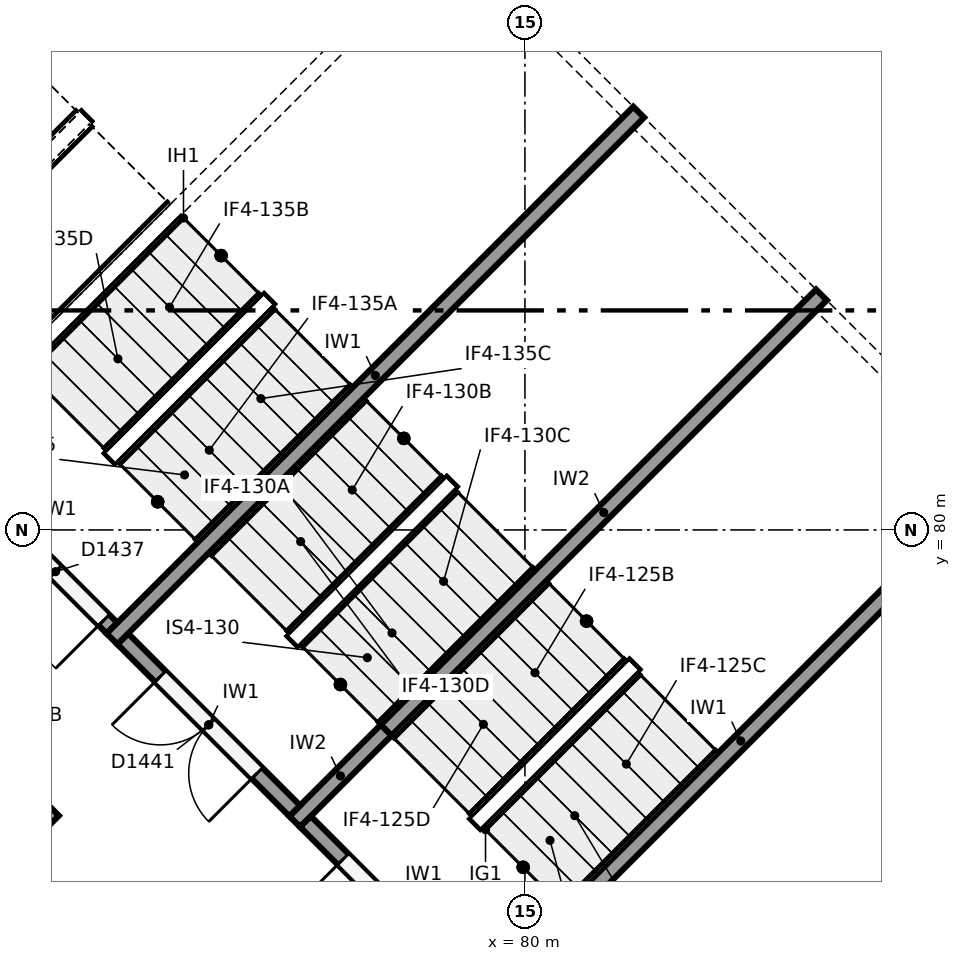
"""IFC4 building model, lengths in metres.
Left out: names, types, materials, properties, quantities, classifications, styles, units other than length and angle.
Written with IfcOpenShell. Run it as: python <this file> out.ifc"""

import sys

from ifc_helpers import new_model, si_unit, direction, frame, frame_2d, origin, place, context, subcontext, project, spatial, rectangle, extrude, element, fill, save


model = new_model("IFC4")
c1 = context("Model", 3, precision=1e-05, world=origin(), true_north=direction((0.0, 1.0)))
c2 = subcontext(c1, "Body", "Model", "MODEL_VIEW")
j1 = project(units=[si_unit("LENGTHUNIT", "METRE"), si_unit("PLANEANGLEUNIT", "RADIAN")], contexts=[c1])
p1 = place(None, origin())
s1 = spatial("IfcSite", under=j1, at=p1, CompositionType="ELEMENT")
p2 = place(p1, origin())
s2 = spatial("IfcBuilding", under=s1, at=p2, CompositionType="ELEMENT")
p3 = place(p2, frame((0.0, 0.0, 18.0)))
s3 = spatial("IfcBuildingStorey", under=s2, at=p3, CompositionType="ELEMENT", Elevation=18.0)
for number, where, z_axis, x_axis in (
    (1, (86.305, 80.688, 0.0), (0.0, 0.0, 1.0), (-0.707, -0.707, 0.0)),
    (2, (81.497, 85.497, 0.0), (0.0, 0.0, 1.0), (-0.707, -0.707, 0.0)),
    (3, (76.688, 90.305, 0.0), (0.0, 0.0, 1.0), (-0.707, -0.707, 0.0)),
):
    element("IfcWall", number, at=place(p3, frame(where, z_axis=z_axis, x_axis=x_axis)), inside=s3, PredefinedType="SHEAR", context=c2, shape_type="SweptSolid", body=[
        extrude(rectangle(XDim=9.8, YDim=0.2, at=frame_2d((4.9, 0.0))), origin(), (0.0, 0.0, 1.0), 5.6),
    ])
for number, where, z_axis, x_axis in (
    (4, (86.164, 80.688, 0.0), (0.0, 0.0, 1.0), (-0.707, 0.707, 0.0)),
    (5, (81.355, 85.497, 0.0), (0.0, 0.0, 1.0), (-0.707, 0.707, 0.0)),
):
    element("IfcWall", number, at=place(p3, frame(where, z_axis=z_axis, x_axis=x_axis)), inside=s3, PredefinedType="SHEAR", context=c2, shape_type="SweptSolid", body=[
        extrude(rectangle(XDim=6.6, YDim=0.2, at=frame_2d((3.3, 0.0))), origin(), (0.0, 0.0, 1.0), 5.6),
    ])
p4 = place(p3, frame((83.901, 83.093, 0.0), z_axis=(0.0, 0.0, 1.0), x_axis=(-0.707106781187, -0.707106781187, 0.0)))
e6 = element("IfcWall", 6, at=p4, inside=s3, PredefinedType="SHEAR", context=c2, shape_type="SweptSolid", body=[
    extrude(rectangle(XDim=8.1, YDim=0.2, at=frame_2d((4.05, 0.0))), origin(), (0.0, 0.0, 1.0), 5.6),
])
p5 = place(p3, frame((78.173, 77.365, 0.0), z_axis=(0.0, 0.0, 1.0), x_axis=(-0.707178586901, -0.707034968179, 0.0)))
e7 = element("IfcWall", 7, at=p5, inside=s3, PredefinedType="SHEAR", context=c2, shape_type="SweptSolid", body=[
    extrude(rectangle(XDim=1.7, YDim=0.2, at=frame_2d((0.85, 0.0))), origin(), (0.0, 0.0, 1.0), 5.6),
])
p6 = place(p3, frame((79.093, 87.901, 0.0), z_axis=(0.0, 0.0, 1.0), x_axis=(-0.707106781187, -0.707106781187, 0.0)))
e8 = element("IfcWall", 8, at=p6, inside=s3, PredefinedType="SHEAR", context=c2, shape_type="SweptSolid", body=[
    extrude(rectangle(XDim=8.1, YDim=0.2, at=frame_2d((4.05, 0.0))), origin(), (0.0, 0.0, 1.0), 5.6),
])
p7 = place(p3, frame((79.375, 73.9, 0.0), z_axis=(0.0, 0.0, 1.0), x_axis=(-0.707068634461, 0.707144925854, 0.0)))
e9 = element("IfcWall", 9, at=p7, inside=s3, PredefinedType="SHEAR", context=c2, shape_type="SweptSolid", body=[
    extrude(rectangle(XDim=3.2, YDim=0.2, at=frame_2d((1.6, 0.0))), origin(), (0.0, 0.0, 1.0), 5.6),
])
p8 = place(p7, frame((0.7, 0.0, 0.0)))
e10 = element("IfcOpeningElement", 10, at=p8, cuts=e9, PredefinedType="OPENING", context=c2, shape_type="SweptSolid", body=[
    extrude(rectangle(XDim=1.8, YDim=2.1, at=frame_2d((0.9, 1.05))), frame((0.0, 0.11, 0.0), z_axis=(0.0, -1.0, 0.0), x_axis=(1.0, 0.0, 0.0)), (0.0, 0.0, 1.0), 0.22),
])
p9 = place(p3, frame((76.971, 76.304, 0.0), z_axis=(0.0, 0.0, 1.0), x_axis=(-0.707106781187, 0.707106781187, 0.0)))
e11 = element("IfcWall", 11, at=p9, inside=s3, PredefinedType="SHEAR", context=c2, shape_type="SweptSolid", body=[
    extrude(rectangle(XDim=3.2, YDim=0.2, at=frame_2d((1.6, 0.0))), origin(), (0.0, 0.0, 1.0), 5.6),
])
p10 = place(p9, frame((0.7, 0.0, 0.0)))
e12 = element("IfcOpeningElement", 12, at=p10, cuts=e11, PredefinedType="OPENING", context=c2, shape_type="SweptSolid", body=[
    extrude(rectangle(XDim=1.8, YDim=2.1, at=frame_2d((0.9, 1.05))), frame((0.0, 0.11, 0.0), z_axis=(0.0, -1.0, 0.0), x_axis=(1.0, 0.0, 0.0)), (0.0, 0.0, 1.0), 0.22),
])
p11 = place(p3, frame((74.567, 78.708, 0.0), z_axis=(0.0, 0.0, 1.0), x_axis=(-0.707106781187, 0.707106781187, 0.0)))
e13 = element("IfcWall", 13, at=p11, inside=s3, PredefinedType="SHEAR", context=c2, shape_type="SweptSolid", body=[
    extrude(rectangle(XDim=3.2, YDim=0.2, at=frame_2d((1.6, 0.0))), origin(), (0.0, 0.0, 1.0), 5.6),
])
p12 = place(p11, frame((0.15, 0.0, 0.0)))
e14 = element("IfcOpeningElement", 14, at=p12, cuts=e13, PredefinedType="OPENING", context=c2, shape_type="SweptSolid", body=[
    extrude(rectangle(XDim=1.8, YDim=2.1, at=frame_2d((0.9, 1.05))), frame((0.0, 0.11, 0.0), z_axis=(0.0, -1.0, 0.0), x_axis=(1.0, 0.0, 0.0)), (0.0, 0.0, 1.0), 0.22),
])
p13 = place(p3, frame((73.797, 76.312, 0.0), z_axis=(0.0, 0.0, 1.0), x_axis=(-0.707106781187, -0.707106781187, 0.0)))
e15 = element("IfcWall", 15, at=p13, inside=s3, PredefinedType="SHEAR", context=c2, shape_type="SweptSolid", body=[
    extrude(rectangle(XDim=3.0, YDim=0.2, at=frame_2d((1.5, 0.0))), origin(), (0.0, 0.0, 1.0), 4.6),
])
p14 = place(p8, origin())
e16 = element("IfcDoor", 16, at=p14, inside=s3, OperationType="DOUBLE_DOOR_SINGLE_SWING", PredefinedType="DOOR", context=c2, shape_type="SweptSolid", body=[
    extrude(rectangle(XDim=1.8, YDim=2.1, at=frame_2d((0.9, 1.05))), frame((0.0, 0.025, 0.0), z_axis=(0.0, -1.0, 0.0), x_axis=(1.0, 0.0, 0.0)), (0.0, 0.0, 1.0), 0.05),
])
fill(e10, e16)
p15 = place(p10, origin())
e17 = element("IfcDoor", 17, at=p15, inside=s3, OperationType="DOUBLE_DOOR_SINGLE_SWING", PredefinedType="DOOR", context=c2, shape_type="SweptSolid", body=[
    extrude(rectangle(XDim=1.8, YDim=2.1, at=frame_2d((0.9, 1.05))), frame((0.0, 0.025, 0.0), z_axis=(0.0, -1.0, 0.0), x_axis=(1.0, 0.0, 0.0)), (0.0, 0.0, 1.0), 0.05),
])
fill(e12, e17)
p16 = place(p12, origin())
e18 = element("IfcDoor", 18, at=p16, inside=s3, OperationType="DOUBLE_DOOR_SINGLE_SWING", PredefinedType="DOOR", context=c2, shape_type="SweptSolid", body=[
    extrude(rectangle(XDim=1.8, YDim=2.1, at=frame_2d((0.9, 1.05))), frame((0.0, 0.025, 0.0), z_axis=(0.0, -1.0, 0.0), x_axis=(1.0, 0.0, 0.0)), (0.0, 0.0, 1.0), 0.05),
])
fill(e14, e18)
save(model, sys.argv[1])
